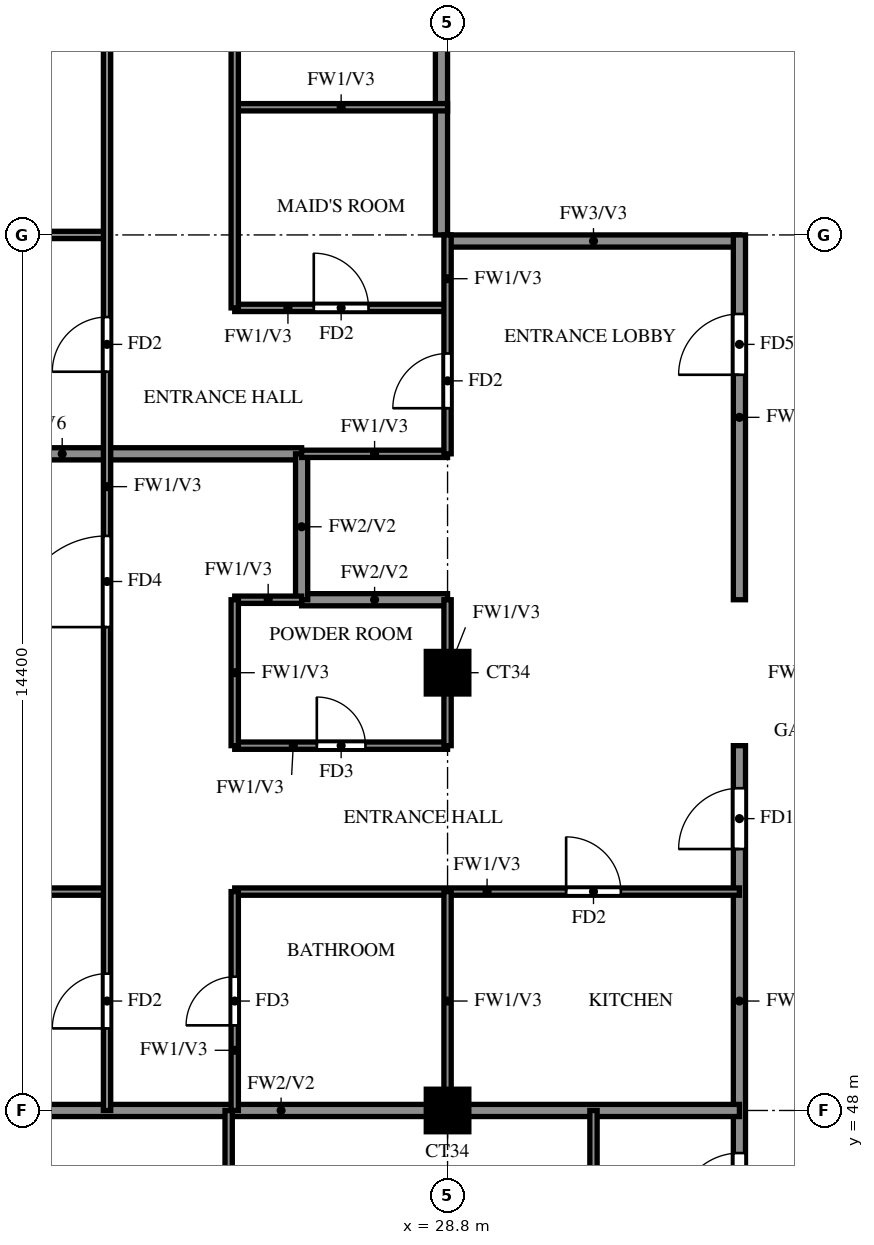
"""IFC4 building model, lengths in metres.
Left out: names, types, materials, properties, quantities, classifications, styles, units other than length and angle.
Written with IfcOpenShell. Run it as: python <this file> out.ifc"""

import sys

from ifc_helpers import new_model, si_unit, direction, frame, frame_2d, origin, origin_2d, place, context, subcontext, project, spatial, rectangle, extrude, source, transform, mapped, element, fill, save


model = new_model("IFC4")
c1 = context("Model", 3, precision=1e-05, world=origin(), true_north=direction((0.0, 1.0)))
c2 = subcontext(c1, "Body", "Model", "MODEL_VIEW")
j1 = project(units=[si_unit("LENGTHUNIT", "METRE"), si_unit("PLANEANGLEUNIT", "RADIAN")], contexts=[c1])
p1 = place(None, origin())
s1 = spatial("IfcSite", under=j1, at=p1, CompositionType="ELEMENT")
p2 = place(p1, origin())
s2 = spatial("IfcBuilding", under=s1, at=p2, CompositionType="ELEMENT")
p3 = place(p2, frame((0.0, 0.0, 253.5)))
s3 = spatial("IfcBuildingStorey", under=s2, at=p3, CompositionType="ELEMENT", Elevation=253.5)
m1 = source(origin(), c2, "Body", "SweptSolid", [
    extrude(rectangle(XDim=0.7, YDim=0.7, at=origin_2d()), origin(), (0.0, 0.0, 1.0), 3.22),
])
for number, where, z_axis, x_axis in (
    (1, (28.8, 48.0, 0.0), (0.0, 0.0, 1.0), (1.0, 0.0, 0.0)),
    (2, (28.8, 55.2, 0.0), (0.0, 0.0, 1.0), (1.0, 0.0, 0.0)),
):
    element("IfcColumn", number, at=place(p3, frame(where, z_axis=z_axis, x_axis=x_axis)), inside=s3, PredefinedType="COLUMN", context=c2, shape_type="MappedRepresentation", body=[
        mapped(m1, transform((0.0, 0.0, 0.0))),
    ])
p4 = place(p3, frame((28.8, 62.3, 0.0), z_axis=(0.0, 0.0, 1.0), x_axis=(1.0, 0.0, 0.0)))
e3 = element("IfcWall", 3, at=p4, inside=s3, PredefinedType="SOLIDWALL", context=c2, shape_type="SweptSolid", body=[
    extrude(rectangle(XDim=4.8, YDim=0.2, at=frame_2d((2.4, 0.0))), origin(), (0.0, 0.0, 1.0), 3.22),
])
p5 = place(p3, frame((28.7, 62.4, 0.0), z_axis=(0.0, 0.0, 1.0), x_axis=(0.0, 1.0, 0.0)))
e4 = element("IfcWall", 4, at=p5, inside=s3, PredefinedType="SOLIDWALL", context=c2, shape_type="SweptSolid", body=[
    extrude(rectangle(XDim=15.6, YDim=0.2, at=frame_2d((7.8, 0.0))), origin(), (0.0, 0.0, 1.0), 3.22),
])
p6 = place(p3, frame((33.6, 45.6, 0.0), z_axis=(0.0, 0.0, 1.0), x_axis=(0.0, 1.0, 0.0)))
e5 = element("IfcWall", 5, at=p6, inside=s3, PredefinedType="SOLIDWALL", context=c2, shape_type="SweptSolid", body=[
    extrude(rectangle(XDim=8.4, YDim=0.2, at=frame_2d((4.2, 0.0))), origin(), (0.0, 0.0, 1.0), 3.22),
])
p7 = place(p6, frame((0.7, 0.0, 0.0)))
e6 = element("IfcOpeningElement", 6, at=p7, cuts=e5, PredefinedType="OPENING", context=c2, shape_type="SweptSolid", body=[
    extrude(rectangle(XDim=1.0, YDim=2.1, at=frame_2d((0.5, 1.05))), frame((0.0, 0.11, 0.0), z_axis=(0.0, -1.0, 0.0), x_axis=(1.0, 0.0, 0.0)), (0.0, 0.0, 1.0), 0.22),
])
p8 = place(p6, frame((6.7, 0.0, 0.0)))
e7 = element("IfcOpeningElement", 7, at=p8, cuts=e5, PredefinedType="OPENING", context=c2, shape_type="SweptSolid", body=[
    extrude(rectangle(XDim=1.0, YDim=2.1, at=frame_2d((0.5, 1.05))), frame((0.0, 0.11, 0.0), z_axis=(0.0, -1.0, 0.0), x_axis=(1.0, 0.0, 0.0)), (0.0, 0.0, 1.0), 0.22),
])
p9 = place(p3, frame((33.6, 56.4, 0.0), z_axis=(0.0, 0.0, 1.0), x_axis=(0.0, 1.0, 0.0)))
e8 = element("IfcWall", 8, at=p9, inside=s3, PredefinedType="SOLIDWALL", context=c2, shape_type="SweptSolid", body=[
    extrude(rectangle(XDim=6.0, YDim=0.2, at=frame_2d((3.0, 0.0))), origin(), (0.0, 0.0, 1.0), 3.22),
])
p10 = place(p9, frame((3.7, 0.0, 0.0)))
e9 = element("IfcOpeningElement", 9, at=p10, cuts=e8, PredefinedType="OPENING", context=c2, shape_type="SweptSolid", body=[
    extrude(rectangle(XDim=1.0, YDim=2.1, at=frame_2d((0.5, 1.05))), frame((0.0, 0.11, 0.0), z_axis=(0.0, -1.0, 0.0), x_axis=(1.0, 0.0, 0.0)), (0.0, 0.0, 1.0), 0.22),
])
p11 = place(p3, frame((18.525, 48.0, 0.0), z_axis=(0.0, 0.0, 1.0), x_axis=(1.0, 0.0, 0.0)))
e10 = element("IfcWall", 10, at=p11, inside=s3, PredefinedType="SOLIDWALL", context=c2, shape_type="SweptSolid", body=[
    extrude(rectangle(XDim=15.075, YDim=0.2, at=frame_2d((7.538, 0.0))), origin(), (0.0, 0.0, 1.0), 3.22),
])
p12 = place(p3, frame((26.4, 56.4, 0.0), z_axis=(0.0, 0.0, 1.0), x_axis=(1.0, 0.0, 0.0)))
e11 = element("IfcWall", 11, at=p12, inside=s3, PredefinedType="SOLIDWALL", context=c2, shape_type="SweptSolid", body=[
    extrude(rectangle(XDim=2.4, YDim=0.2, at=frame_2d((1.2, 0.0))), origin(), (0.0, 0.0, 1.0), 3.22),
])
p13 = place(p3, frame((18.525, 58.8, 0.0), z_axis=(0.0, 0.0, 1.0), x_axis=(1.0, 0.0, 0.0)))
e12 = element("IfcWall", 12, at=p13, inside=s3, PredefinedType="SOLIDWALL", context=c2, shape_type="SweptSolid", body=[
    extrude(rectangle(XDim=7.875, YDim=0.2, at=frame_2d((3.938, 0.0))), origin(), (0.0, 0.0, 1.0), 2.32),
])
p14 = place(p3, frame((26.4, 56.4, 0.0), z_axis=(0.0, 0.0, 1.0), x_axis=(0.0, 1.0, 0.0)))
e13 = element("IfcWall", 13, at=p14, inside=s3, PredefinedType="SOLIDWALL", context=c2, shape_type="SweptSolid", body=[
    extrude(rectangle(XDim=2.4, YDim=0.2, at=frame_2d((1.2, 0.0))), origin(), (0.0, 0.0, 1.0), 3.22),
])
p15 = place(p3, frame((18.525, 51.6, 0.0), z_axis=(0.0, 0.0, 1.0), x_axis=(1.0, 0.0, 0.0)))
e14 = element("IfcWall", 14, at=p15, inside=s3, PredefinedType="PARTITIONING", context=c2, shape_type="SweptSolid", body=[
    extrude(rectangle(XDim=4.675, YDim=0.12, at=frame_2d((2.337, 0.0))), origin(), (0.0, 0.0, 1.0), 2.32),
])
p16 = place(p3, frame((25.3, 51.6, 0.0), z_axis=(0.0, 0.0, 1.0), x_axis=(1.0, 0.0, 0.0)))
e15 = element("IfcWall", 15, at=p16, inside=s3, PredefinedType="PARTITIONING", context=c2, shape_type="SweptSolid", body=[
    extrude(rectangle(XDim=8.3, YDim=0.12, at=frame_2d((4.15, 0.0))), origin(), (0.0, 0.0, 1.0), 3.22),
])
p17 = place(p16, frame((5.45, 0.0, 0.0)))
e16 = element("IfcOpeningElement", 16, at=p17, cuts=e15, PredefinedType="OPENING", context=c2, shape_type="SweptSolid", body=[
    extrude(rectangle(XDim=0.9, YDim=2.1, at=frame_2d((0.45, 1.05))), frame((0.0, 0.07, 0.0), z_axis=(0.0, -1.0, 0.0), x_axis=(1.0, 0.0, 0.0)), (0.0, 0.0, 1.0), 0.14),
])
p18 = place(p3, frame((25.3, 54.0, 0.0), z_axis=(0.0, 0.0, 1.0), x_axis=(1.0, 0.0, 0.0)))
e17 = element("IfcWall", 17, at=p18, inside=s3, PredefinedType="PARTITIONING", context=c2, shape_type="SweptSolid", body=[
    extrude(rectangle(XDim=3.5, YDim=0.12, at=frame_2d((1.75, 0.0))), origin(), (0.0, 0.0, 1.0), 3.22),
])
p19 = place(p18, frame((1.35, 0.0, 0.0)))
e18 = element("IfcOpeningElement", 18, at=p19, cuts=e17, PredefinedType="OPENING", context=c2, shape_type="SweptSolid", body=[
    extrude(rectangle(XDim=0.8, YDim=2.1, at=frame_2d((0.4, 1.05))), frame((0.0, 0.07, 0.0), z_axis=(0.0, -1.0, 0.0), x_axis=(1.0, 0.0, 0.0)), (0.0, 0.0, 1.0), 0.14),
])
p20 = place(p3, frame((25.3, 56.4, 0.0), z_axis=(0.0, 0.0, 1.0), x_axis=(1.0, 0.0, 0.0)))
e19 = element("IfcWall", 19, at=p20, inside=s3, PredefinedType="PARTITIONING", context=c2, shape_type="SweptSolid", body=[
    extrude(rectangle(XDim=1.1, YDim=0.12, at=frame_2d((0.55, 0.0))), origin(), (0.0, 0.0, 1.0), 3.22),
])
p21 = place(p3, frame((26.4, 58.8, 0.0), z_axis=(0.0, 0.0, 1.0), x_axis=(1.0, 0.0, 0.0)))
e20 = element("IfcWall", 20, at=p21, inside=s3, PredefinedType="PARTITIONING", context=c2, shape_type="SweptSolid", body=[
    extrude(rectangle(XDim=2.4, YDim=0.12, at=frame_2d((1.2, 0.0))), origin(), (0.0, 0.0, 1.0), 3.22),
])
p22 = place(p3, frame((25.3, 61.2, 0.0), z_axis=(0.0, 0.0, 1.0), x_axis=(1.0, 0.0, 0.0)))
e21 = element("IfcWall", 21, at=p22, inside=s3, PredefinedType="PARTITIONING", context=c2, shape_type="SweptSolid", body=[
    extrude(rectangle(XDim=3.5, YDim=0.12, at=frame_2d((1.75, 0.0))), origin(), (0.0, 0.0, 1.0), 3.22),
])
p23 = place(p22, frame((1.3, 0.0, 0.0)))
e22 = element("IfcOpeningElement", 22, at=p23, cuts=e21, PredefinedType="OPENING", context=c2, shape_type="SweptSolid", body=[
    extrude(rectangle(XDim=0.9, YDim=2.1, at=frame_2d((0.45, 1.05))), frame((0.0, 0.07, 0.0), z_axis=(0.0, -1.0, 0.0), x_axis=(1.0, 0.0, 0.0)), (0.0, 0.0, 1.0), 0.14),
])
p24 = place(p3, frame((18.525, 62.4, 0.0), z_axis=(0.0, 0.0, 1.0), x_axis=(1.0, 0.0, 0.0)))
e23 = element("IfcWall", 23, at=p24, inside=s3, PredefinedType="PARTITIONING", context=c2, shape_type="SweptSolid", body=[
    extrude(rectangle(XDim=4.675, YDim=0.12, at=frame_2d((2.337, 0.0))), origin(), (0.0, 0.0, 1.0), 3.22),
])
p25 = place(p3, frame((25.3, 64.5, 0.0), z_axis=(0.0, 0.0, 1.0), x_axis=(1.0, 0.0, 0.0)))
e24 = element("IfcWall", 24, at=p25, inside=s3, PredefinedType="PARTITIONING", context=c2, shape_type="SweptSolid", body=[
    extrude(rectangle(XDim=3.5, YDim=0.12, at=frame_2d((1.75, 0.0))), origin(), (0.0, 0.0, 1.0), 3.22),
])
p26 = place(p3, frame((23.2, 48.0, 0.0), z_axis=(0.0, 0.0, 1.0), x_axis=(0.0, 1.0, 0.0)))
e25 = element("IfcWall", 25, at=p26, inside=s3, PredefinedType="PARTITIONING", context=c2, shape_type="SweptSolid", body=[
    extrude(rectangle(XDim=21.6, YDim=0.12, at=frame_2d((10.8, 0.0))), origin(), (0.0, 0.0, 1.0), 3.22),
])
p27 = place(p26, frame((1.35, 0.0, 0.0)))
e26 = element("IfcOpeningElement", 26, at=p27, cuts=e25, PredefinedType="OPENING", context=c2, shape_type="SweptSolid", body=[
    extrude(rectangle(XDim=0.9, YDim=2.1, at=frame_2d((0.45, 1.05))), frame((0.0, 0.07, 0.0), z_axis=(0.0, -1.0, 0.0), x_axis=(1.0, 0.0, 0.0)), (0.0, 0.0, 1.0), 0.14),
])
p28 = place(p26, frame((7.95, 0.0, 0.0)))
e27 = element("IfcOpeningElement", 27, at=p28, cuts=e25, PredefinedType="OPENING", context=c2, shape_type="SweptSolid", body=[
    extrude(rectangle(XDim=1.5, YDim=2.1, at=frame_2d((0.75, 1.05))), frame((0.0, 0.07, 0.0), z_axis=(0.0, -1.0, 0.0), x_axis=(1.0, 0.0, 0.0)), (0.0, 0.0, 1.0), 0.14),
])
p29 = place(p26, frame((12.15, 0.0, 0.0)))
e28 = element("IfcOpeningElement", 28, at=p29, cuts=e25, PredefinedType="OPENING", context=c2, shape_type="SweptSolid", body=[
    extrude(rectangle(XDim=0.9, YDim=2.1, at=frame_2d((0.45, 1.05))), frame((0.0, 0.07, 0.0), z_axis=(0.0, -1.0, 0.0), x_axis=(1.0, 0.0, 0.0)), (0.0, 0.0, 1.0), 0.14),
])
p30 = place(p26, frame((17.55, 0.0, 0.0)))
e29 = element("IfcOpeningElement", 29, at=p30, cuts=e25, PredefinedType="OPENING", context=c2, shape_type="SweptSolid", body=[
    extrude(rectangle(XDim=0.9, YDim=2.1, at=frame_2d((0.45, 1.05))), frame((0.0, 0.07, 0.0), z_axis=(0.0, -1.0, 0.0), x_axis=(1.0, 0.0, 0.0)), (0.0, 0.0, 1.0), 0.14),
])
p31 = place(p3, frame((25.2, 39.725, 0.0), z_axis=(0.0, 0.0, 1.0), x_axis=(0.0, 1.0, 0.0)))
e30 = element("IfcWall", 30, at=p31, inside=s3, PredefinedType="PARTITIONING", context=c2, shape_type="SweptSolid", body=[
    extrude(rectangle(XDim=8.275, YDim=0.12, at=frame_2d((4.137, 0.0))), origin(), (0.0, 0.0, 1.0), 3.22),
])
p32 = place(p31, frame((4.525, 0.0, 0.0)))
e31 = element("IfcOpeningElement", 31, at=p32, cuts=e30, PredefinedType="OPENING", context=c2, shape_type="SweptSolid", body=[
    extrude(rectangle(XDim=0.9, YDim=2.1, at=frame_2d((0.45, 1.05))), frame((0.0, 0.07, 0.0), z_axis=(0.0, -1.0, 0.0), x_axis=(1.0, 0.0, 0.0)), (0.0, 0.0, 1.0), 0.14),
])
p33 = place(p3, frame((25.3, 48.0, 0.0), z_axis=(0.0, 0.0, 1.0), x_axis=(0.0, 1.0, 0.0)))
e32 = element("IfcWall", 32, at=p33, inside=s3, PredefinedType="PARTITIONING", context=c2, shape_type="SweptSolid", body=[
    extrude(rectangle(XDim=3.6, YDim=0.12, at=frame_2d((1.8, 0.0))), origin(), (0.0, 0.0, 1.0), 3.22),
])
p34 = place(p33, frame((1.4, 0.0, 0.0)))
e33 = element("IfcOpeningElement", 33, at=p34, cuts=e32, PredefinedType="OPENING", context=c2, shape_type="SweptSolid", body=[
    extrude(rectangle(XDim=0.8, YDim=2.1, at=frame_2d((0.4, 1.05))), frame((0.0, 0.07, 0.0), z_axis=(0.0, -1.0, 0.0), x_axis=(1.0, 0.0, 0.0)), (0.0, 0.0, 1.0), 0.14),
])
p35 = place(p3, frame((25.3, 54.0, 0.0), z_axis=(0.0, 0.0, 1.0), x_axis=(0.0, 1.0, 0.0)))
e34 = element("IfcWall", 34, at=p35, inside=s3, PredefinedType="PARTITIONING", context=c2, shape_type="SweptSolid", body=[
    extrude(rectangle(XDim=2.4, YDim=0.12, at=frame_2d((1.2, 0.0))), origin(), (0.0, 0.0, 1.0), 3.22),
])
p36 = place(p3, frame((25.3, 61.2, 0.0), z_axis=(0.0, 0.0, 1.0), x_axis=(0.0, 1.0, 0.0)))
e35 = element("IfcWall", 35, at=p36, inside=s3, PredefinedType="PARTITIONING", context=c2, shape_type="SweptSolid", body=[
    extrude(rectangle(XDim=12.0, YDim=0.12, at=frame_2d((6.0, 0.0))), origin(), (0.0, 0.0, 1.0), 3.22),
])
p37 = place(p36, frame((5.3, 0.0, 0.0)))
e36 = element("IfcOpeningElement", 36, at=p37, cuts=e35, PredefinedType="OPENING", context=c2, shape_type="SweptSolid", body=[
    extrude(rectangle(XDim=0.9, YDim=2.1, at=frame_2d((0.45, 1.05))), frame((0.0, 0.07, 0.0), z_axis=(0.0, -1.0, 0.0), x_axis=(1.0, 0.0, 0.0)), (0.0, 0.0, 1.0), 0.14),
])
p38 = place(p36, frame((9.7, 0.0, 0.0)))
e37 = element("IfcOpeningElement", 37, at=p38, cuts=e35, PredefinedType="OPENING", context=c2, shape_type="SweptSolid", body=[
    extrude(rectangle(XDim=0.8, YDim=2.1, at=frame_2d((0.4, 1.05))), frame((0.0, 0.07, 0.0), z_axis=(0.0, -1.0, 0.0), x_axis=(1.0, 0.0, 0.0)), (0.0, 0.0, 1.0), 0.14),
])
p39 = place(p3, frame((28.8, 48.0, 0.0), z_axis=(0.0, 0.0, 1.0), x_axis=(0.0, 1.0, 0.0)))
e38 = element("IfcWall", 38, at=p39, inside=s3, PredefinedType="PARTITIONING", context=c2, shape_type="SweptSolid", body=[
    extrude(rectangle(XDim=3.6, YDim=0.12, at=frame_2d((1.8, 0.0))), origin(), (0.0, 0.0, 1.0), 3.22),
])
p40 = place(p3, frame((28.8, 54.0, 0.0), z_axis=(0.0, 0.0, 1.0), x_axis=(0.0, 1.0, 0.0)))
e39 = element("IfcWall", 39, at=p40, inside=s3, PredefinedType="PARTITIONING", context=c2, shape_type="SweptSolid", body=[
    extrude(rectangle(XDim=2.4, YDim=0.12, at=frame_2d((1.2, 0.0))), origin(), (0.0, 0.0, 1.0), 3.22),
])
p41 = place(p3, frame((28.8, 58.8, 0.0), z_axis=(0.0, 0.0, 1.0), x_axis=(0.0, 1.0, 0.0)))
e40 = element("IfcWall", 40, at=p41, inside=s3, PredefinedType="PARTITIONING", context=c2, shape_type="SweptSolid", body=[
    extrude(rectangle(XDim=3.6, YDim=0.12, at=frame_2d((1.8, 0.0))), origin(), (0.0, 0.0, 1.0), 3.22),
])
p42 = place(p41, frame((0.75, 0.0, 0.0)))
e41 = element("IfcOpeningElement", 41, at=p42, cuts=e40, PredefinedType="OPENING", context=c2, shape_type="SweptSolid", body=[
    extrude(rectangle(XDim=0.9, YDim=2.1, at=frame_2d((0.45, 1.05))), frame((0.0, 0.07, 0.0), z_axis=(0.0, -1.0, 0.0), x_axis=(1.0, 0.0, 0.0)), (0.0, 0.0, 1.0), 0.14),
])
p43 = place(p3, frame((31.2, 45.6, 0.0), z_axis=(0.0, 0.0, 1.0), x_axis=(0.0, 1.0, 0.0)))
e42 = element("IfcWall", 42, at=p43, inside=s3, PredefinedType="PARTITIONING", context=c2, shape_type="SweptSolid", body=[
    extrude(rectangle(XDim=2.4, YDim=0.12, at=frame_2d((1.2, 0.0))), origin(), (0.0, 0.0, 1.0), 3.22),
])
p44 = place(p7, origin())
e43 = element("IfcDoor", 43, at=p44, inside=s3, OperationType="SINGLE_SWING_LEFT", PredefinedType="DOOR", context=c2, shape_type="SweptSolid", body=[
    extrude(rectangle(XDim=1.0, YDim=2.1, at=frame_2d((0.5, 1.05))), frame((0.0, 0.025, 0.0), z_axis=(0.0, -1.0, 0.0), x_axis=(1.0, 0.0, 0.0)), (0.0, 0.0, 1.0), 0.05),
])
fill(e6, e43)
p45 = place(p8, origin())
e44 = element("IfcDoor", 44, at=p45, inside=s3, OperationType="SINGLE_SWING_LEFT", PredefinedType="DOOR", context=c2, shape_type="SweptSolid", body=[
    extrude(rectangle(XDim=1.0, YDim=2.1, at=frame_2d((0.5, 1.05))), frame((0.0, 0.025, 0.0), z_axis=(0.0, -1.0, 0.0), x_axis=(1.0, 0.0, 0.0)), (0.0, 0.0, 1.0), 0.05),
])
fill(e7, e44)
p46 = place(p27, origin())
e45 = element("IfcDoor", 45, at=p46, inside=s3, OperationType="SINGLE_SWING_RIGHT", PredefinedType="DOOR", context=c2, shape_type="SweptSolid", body=[
    extrude(rectangle(XDim=0.9, YDim=2.1, at=frame_2d((0.45, 1.05))), frame((0.0, 0.025, 0.0), z_axis=(0.0, -1.0, 0.0), x_axis=(1.0, 0.0, 0.0)), (0.0, 0.0, 1.0), 0.05),
])
fill(e26, e45)
p47 = place(p28, origin())
e46 = element("IfcDoor", 46, at=p47, inside=s3, OperationType="SINGLE_SWING_RIGHT", PredefinedType="DOOR", context=c2, shape_type="SweptSolid", body=[
    extrude(rectangle(XDim=1.5, YDim=2.1, at=frame_2d((0.75, 1.05))), frame((0.0, 0.025, 0.0), z_axis=(0.0, -1.0, 0.0), x_axis=(1.0, 0.0, 0.0)), (0.0, 0.0, 1.0), 0.05),
])
fill(e27, e46)
p48 = place(p34, origin())
e47 = element("IfcDoor", 47, at=p48, inside=s3, OperationType="SINGLE_SWING_LEFT", PredefinedType="DOOR", context=c2, shape_type="SweptSolid", body=[
    extrude(rectangle(XDim=0.8, YDim=2.1, at=frame_2d((0.4, 1.05))), frame((0.0, 0.025, 0.0), z_axis=(0.0, -1.0, 0.0), x_axis=(1.0, 0.0, 0.0)), (0.0, 0.0, 1.0), 0.05),
])
fill(e33, e47)
p49 = place(p19, origin())
e48 = element("IfcDoor", 48, at=p49, inside=s3, OperationType="SINGLE_SWING_RIGHT", PredefinedType="DOOR", context=c2, shape_type="SweptSolid", body=[
    extrude(rectangle(XDim=0.8, YDim=2.1, at=frame_2d((0.4, 1.05))), frame((0.0, 0.025, 0.0), z_axis=(0.0, -1.0, 0.0), x_axis=(1.0, 0.0, 0.0)), (0.0, 0.0, 1.0), 0.05),
])
fill(e18, e48)
p50 = place(p17, origin())
e49 = element("IfcDoor", 49, at=p50, inside=s3, OperationType="SINGLE_SWING_LEFT", PredefinedType="DOOR", context=c2, shape_type="SweptSolid", body=[
    extrude(rectangle(XDim=0.9, YDim=2.1, at=frame_2d((0.45, 1.05))), frame((0.0, 0.025, 0.0), z_axis=(0.0, -1.0, 0.0), x_axis=(1.0, 0.0, 0.0)), (0.0, 0.0, 1.0), 0.05),
])
fill(e16, e49)
p51 = place(p42, origin())
e50 = element("IfcDoor", 50, at=p51, inside=s3, OperationType="SINGLE_SWING_RIGHT", PredefinedType="DOOR", context=c2, shape_type="SweptSolid", body=[
    extrude(rectangle(XDim=0.9, YDim=2.1, at=frame_2d((0.45, 1.05))), frame((0.0, 0.025, 0.0), z_axis=(0.0, -1.0, 0.0), x_axis=(1.0, 0.0, 0.0)), (0.0, 0.0, 1.0), 0.05),
])
fill(e41, e50)
p52 = place(p10, origin())
e51 = element("IfcDoor", 51, at=p52, inside=s3, OperationType="SINGLE_SWING_LEFT", PredefinedType="DOOR", context=c2, shape_type="SweptSolid", body=[
    extrude(rectangle(XDim=1.0, YDim=2.1, at=frame_2d((0.5, 1.05))), frame((0.0, 0.025, 0.0), z_axis=(0.0, -1.0, 0.0), x_axis=(1.0, 0.0, 0.0)), (0.0, 0.0, 1.0), 0.05),
])
fill(e9, e51)
p53 = place(p29, origin())
e52 = element("IfcDoor", 52, at=p53, inside=s3, OperationType="SINGLE_SWING_LEFT", PredefinedType="DOOR", context=c2, shape_type="SweptSolid", body=[
    extrude(rectangle(XDim=0.9, YDim=2.1, at=frame_2d((0.45, 1.05))), frame((0.0, 0.025, 0.0), z_axis=(0.0, -1.0, 0.0), x_axis=(1.0, 0.0, 0.0)), (0.0, 0.0, 1.0), 0.05),
])
fill(e28, e52)
p54 = place(p23, origin())
e53 = element("IfcDoor", 53, at=p54, inside=s3, OperationType="SINGLE_SWING_RIGHT", PredefinedType="DOOR", context=c2, shape_type="SweptSolid", body=[
    extrude(rectangle(XDim=0.9, YDim=2.1, at=frame_2d((0.45, 1.05))), frame((0.0, 0.025, 0.0), z_axis=(0.0, -1.0, 0.0), x_axis=(1.0, 0.0, 0.0)), (0.0, 0.0, 1.0), 0.05),
])
fill(e22, e53)
save(model, sys.argv[1])
